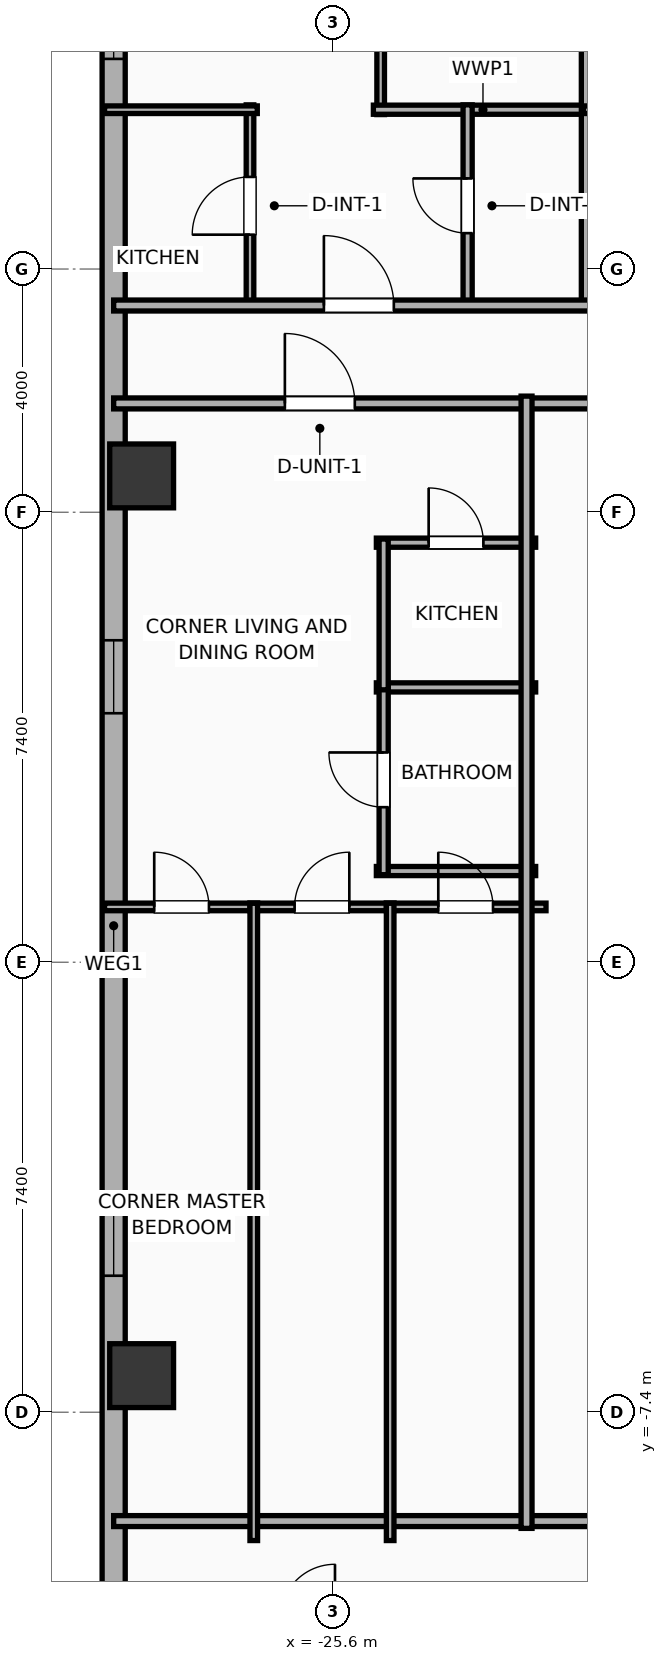
"""IFC4 building model, lengths in metres.
Left out: names, types, materials, properties, quantities, classifications, styles, units other than length and angle.
Written with IfcOpenShell. Run it as: python <this file> out.ifc"""

import sys

from ifc_helpers import new_model, si_unit, direction, frame, frame_2d, origin, origin_2d, place, context, subcontext, project, spatial, rectangle, hollow_rectangle, extrude, element, fill, save


model = new_model("IFC4")
c1 = context("Model", 3, precision=1e-05, world=origin(), true_north=direction((0.0, 1.0)))
c2 = subcontext(c1, "Body", "Model", "MODEL_VIEW")
j1 = project(units=[si_unit("LENGTHUNIT", "METRE"), si_unit("PLANEANGLEUNIT", "RADIAN")], contexts=[c1])
p1 = place(None, origin())
s1 = spatial("IfcSite", under=j1, at=p1, CompositionType="ELEMENT")
p2 = place(p1, origin())
s2 = spatial("IfcBuilding", under=s1, at=p2, CompositionType="ELEMENT")
p3 = place(p2, frame((0.0, 0.0, 109.2)))
s3 = spatial("IfcBuildingStorey", under=s2, at=p3, CompositionType="ELEMENT", Elevation=109.2)
for number, where, z_axis, x_axis in (
    (1, (-28.75, 7.998, 0.0), (0.0, 0.0, 1.0), (1.0, 0.0, 0.0)),
    (2, (-28.75, -6.798, 0.0), (0.0, 0.0, 1.0), (1.0, 0.0, 0.0)),
):
    element("IfcColumn", number, at=place(p3, frame(where, z_axis=z_axis, x_axis=x_axis)), inside=s3, PredefinedType="COLUMN", context=c2, shape_type="SweptSolid", body=[
        extrude(hollow_rectangle(XDim=1.05, YDim=1.05, WallThickness=0.036, at=origin_2d()), origin(), (0.0, 0.0, 1.0), 3.9),
    ])
p4 = place(p3, frame((-29.21, -16.581, 0.0), z_axis=(0.0, 0.0, 1.0), x_axis=(0.0, 1.0, 0.0)))
e3 = element("IfcWall", 3, at=p4, inside=s3, PredefinedType="ELEMENTEDWALL", context=c2, shape_type="SweptSolid", body=[
    extrude(rectangle(XDim=34.363, YDim=0.38, at=frame_2d((17.181, 0.0))), origin(), (0.0, 0.0, 1.0), 3.65),
])
p5 = place(p4, frame((31.437, 0.0, 0.75)))
e4 = element("IfcOpeningElement", 4, at=p5, cuts=e3, PredefinedType="OPENING", context=c2, shape_type="SweptSolid", body=[
    extrude(rectangle(XDim=1.2, YDim=2.05, at=frame_2d((0.6, 1.025))), frame((0.0, 0.2, 0.0), z_axis=(0.0, -1.0, 0.0), x_axis=(1.0, 0.0, 0.0)), (0.0, 0.0, 1.0), 0.4),
])
p6 = place(p4, frame((20.676, 0.0, 0.75)))
e5 = element("IfcOpeningElement", 5, at=p6, cuts=e3, PredefinedType="OPENING", context=c2, shape_type="SweptSolid", body=[
    extrude(rectangle(XDim=1.2, YDim=2.05, at=frame_2d((0.6, 1.025))), frame((0.0, 0.2, 0.0), z_axis=(0.0, -1.0, 0.0), x_axis=(1.0, 0.0, 0.0)), (0.0, 0.0, 1.0), 0.4),
])
p7 = place(p4, frame((11.426, 0.0, 0.75)))
e6 = element("IfcOpeningElement", 6, at=p7, cuts=e3, PredefinedType="OPENING", context=c2, shape_type="SweptSolid", body=[
    extrude(rectangle(XDim=1.2, YDim=2.05, at=frame_2d((0.6, 1.025))), frame((0.0, 0.2, 0.0), z_axis=(0.0, -1.0, 0.0), x_axis=(1.0, 0.0, 0.0)), (0.0, 0.0, 1.0), 0.4),
])
p8 = place(p3, frame((-29.21, 9.19, 0.0), z_axis=(0.0, 0.0, 1.0), x_axis=(1.0, 0.0, 0.0)))
e7 = element("IfcWall", 7, at=p8, inside=s3, PredefinedType="PARTITIONING", context=c2, shape_type="SweptSolid", body=[
    extrude(rectangle(XDim=19.33, YDim=0.18, at=frame_2d((9.665, 0.0))), origin(), (0.0, 0.0, 1.0), 3.65),
])
p9 = place(p8, frame((2.815, 0.0, 0.0)))
e8 = element("IfcOpeningElement", 8, at=p9, cuts=e7, PredefinedType="OPENING", context=c2, shape_type="SweptSolid", body=[
    extrude(rectangle(XDim=1.15, YDim=2.05, at=frame_2d((0.575, 1.025))), frame((0.0, 0.1, 0.0), z_axis=(0.0, -1.0, 0.0), x_axis=(1.0, 0.0, 0.0)), (0.0, 0.0, 1.0), 0.2),
])
p10 = place(p3, frame((-29.21, -9.19, 0.0), z_axis=(0.0, 0.0, 1.0), x_axis=(1.0, 0.0, 0.0)))
e9 = element("IfcWall", 9, at=p10, inside=s3, PredefinedType="PARTITIONING", context=c2, shape_type="SweptSolid", body=[
    extrude(rectangle(XDim=19.33, YDim=0.18, at=frame_2d((9.665, 0.0))), origin(), (0.0, 0.0, 1.0), 3.65),
])
p11 = place(p3, frame((-24.819, 13.94, 0.0), z_axis=(0.0, 0.0, 1.0), x_axis=(0.0, 1.0, 0.0)))
e10 = element("IfcWall", 10, at=p11, inside=s3, PredefinedType="PARTITIONING", context=c2, shape_type="SweptSolid", body=[
    extrude(rectangle(XDim=7.82, YDim=0.125, at=frame_2d((3.91, 0.0))), origin(), (0.0, 0.0, 1.0), 3.65),
])
p12 = place(p11, frame((1.427, 0.0, 0.0)))
e11 = element("IfcOpeningElement", 11, at=p12, cuts=e10, PredefinedType="OPENING", context=c2, shape_type="SweptSolid", body=[
    extrude(rectangle(XDim=0.9, YDim=2.05, at=frame_2d((0.45, 1.025))), frame((0.0, 0.073, 0.0), z_axis=(0.0, -1.0, 0.0), x_axis=(1.0, 0.0, 0.0)), (0.0, 0.0, 1.0), 0.145),
])
p13 = place(p3, frame((-24.939, 14.02, 0.0), z_axis=(0.0, 0.0, 1.0), x_axis=(1.0, 0.0, 0.0)))
e12 = element("IfcWall", 12, at=p13, inside=s3, PredefinedType="PLUMBINGWALL", context=c2, shape_type="SweptSolid", body=[
    extrude(rectangle(XDim=3.605, YDim=0.15, at=frame_2d((1.802, 0.0))), origin(), (0.0, 0.0, 1.0), 3.65),
])
p14 = place(p3, frame((-26.968, 10.78, 0.0), z_axis=(0.0, 0.0, 1.0), x_axis=(0.0, 1.0, 0.0)))
e13 = element("IfcWall", 13, at=p14, inside=s3, PredefinedType="PARTITIONING", context=c2, shape_type="SweptSolid", body=[
    extrude(rectangle(XDim=3.32, YDim=0.125, at=frame_2d((1.66, 0.0))), origin(), (0.0, 0.0, 1.0), 3.65),
])
p15 = place(p14, frame((1.185, 0.0, 0.0)))
e14 = element("IfcOpeningElement", 14, at=p15, cuts=e13, PredefinedType="OPENING", context=c2, shape_type="SweptSolid", body=[
    extrude(rectangle(XDim=0.95, YDim=2.05, at=frame_2d((0.475, 1.025))), frame((0.0, 0.073, 0.0), z_axis=(0.0, -1.0, 0.0), x_axis=(1.0, 0.0, 0.0)), (0.0, 0.0, 1.0), 0.145),
])
p16 = place(p3, frame((-29.36, 14.02, 0.0), z_axis=(0.0, 0.0, 1.0), x_axis=(1.0, 0.0, 0.0)))
e15 = element("IfcWall", 15, at=p16, inside=s3, PredefinedType="PARTITIONING", context=c2, shape_type="SweptSolid", body=[
    extrude(rectangle(XDim=2.512, YDim=0.125, at=frame_2d((1.256, 0.0))), origin(), (0.0, 0.0, 1.0), 3.65),
])
p17 = place(p3, frame((-23.389, 10.78, 0.0), z_axis=(0.0, 0.0, 1.0), x_axis=(0.0, 1.0, 0.0)))
e16 = element("IfcWall", 16, at=p17, inside=s3, PredefinedType="PLUMBINGWALL", context=c2, shape_type="SweptSolid", body=[
    extrude(rectangle(XDim=3.32, YDim=0.15, at=frame_2d((1.66, 0.0))), origin(), (0.0, 0.0, 1.0), 3.65),
])
p18 = place(p17, frame((1.21, 0.0, 0.0)))
e17 = element("IfcOpeningElement", 17, at=p18, cuts=e16, PredefinedType="OPENING", context=c2, shape_type="SweptSolid", body=[
    extrude(rectangle(XDim=0.9, YDim=2.05, at=frame_2d((0.45, 1.025))), frame((0.0, 0.085, 0.0), z_axis=(0.0, -1.0, 0.0), x_axis=(1.0, 0.0, 0.0)), (0.0, 0.0, 1.0), 0.17),
])
p19 = place(p3, frame((-21.409, 10.72, 0.0), z_axis=(0.0, 0.0, 1.0), x_axis=(0.0, 1.0, 0.0)))
e18 = element("IfcWall", 18, at=p19, inside=s3, PredefinedType="PARTITIONING", context=c2, shape_type="SweptSolid", body=[
    extrude(rectangle(XDim=10.89, YDim=0.22, at=frame_2d((5.445, 0.0))), origin(), (0.0, 0.0, 1.0), 3.65),
])
p20 = place(p3, frame((-21.484, 14.02, 0.0), z_axis=(0.0, 0.0, 1.0), x_axis=(1.0, 0.0, 0.0)))
e19 = element("IfcWall", 19, at=p20, inside=s3, PredefinedType="PARTITIONING", context=c2, shape_type="SweptSolid", body=[
    extrude(rectangle(XDim=2.505, YDim=0.125, at=frame_2d((1.252, 0.0))), origin(), (0.0, 0.0, 1.0), 3.65),
])
p21 = place(p3, frame((-29.21, 10.8, 0.0), z_axis=(0.0, 0.0, 1.0), x_axis=(1.0, 0.0, 0.0)))
e20 = element("IfcWall", 20, at=p21, inside=s3, PredefinedType="PARTITIONING", context=c2, shape_type="SweptSolid", body=[
    extrude(rectangle(XDim=62.42, YDim=0.18, at=frame_2d((31.21, 0.0))), origin(), (0.0, 0.0, 1.0), 3.65),
])
p22 = place(p21, frame((3.457, 0.0, 0.0)))
e21 = element("IfcOpeningElement", 21, at=p22, cuts=e20, PredefinedType="OPENING", context=c2, shape_type="SweptSolid", body=[
    extrude(rectangle(XDim=1.15, YDim=2.05, at=frame_2d((0.575, 1.025))), frame((0.0, 0.1, 0.0), z_axis=(0.0, -1.0, 0.0), x_axis=(1.0, 0.0, 0.0)), (0.0, 0.0, 1.0), 0.2),
])
p23 = place(p21, frame((11.297, 0.0, 0.0)))
e22 = element("IfcOpeningElement", 22, at=p23, cuts=e20, PredefinedType="OPENING", context=c2, shape_type="SweptSolid", body=[
    extrude(rectangle(XDim=1.15, YDim=2.05, at=frame_2d((0.575, 1.025))), frame((0.0, 0.1, 0.0), z_axis=(0.0, -1.0, 0.0), x_axis=(1.0, 0.0, 0.0)), (0.0, 0.0, 1.0), 0.2),
])
p24 = place(p21, frame((18.925, 0.0, 0.0)))
e23 = element("IfcOpeningElement", 23, at=p24, cuts=e20, PredefinedType="OPENING", context=c2, shape_type="SweptSolid", body=[
    extrude(rectangle(XDim=1.15, YDim=2.05, at=frame_2d((0.575, 1.025))), frame((0.0, 0.1, 0.0), z_axis=(0.0, -1.0, 0.0), x_axis=(1.0, 0.0, 0.0)), (0.0, 0.0, 1.0), 0.2),
])
p25 = place(p21, frame((24.362, 0.0, 0.0)))
e24 = element("IfcOpeningElement", 24, at=p25, cuts=e20, PredefinedType="OPENING", context=c2, shape_type="SweptSolid", body=[
    extrude(rectangle(XDim=1.15, YDim=2.05, at=frame_2d((0.575, 1.025))), frame((0.0, 0.1, 0.0), z_axis=(0.0, -1.0, 0.0), x_axis=(1.0, 0.0, 0.0)), (0.0, 0.0, 1.0), 0.2),
])
p26 = place(p21, frame((27.708, 0.0, 0.0)))
e25 = element("IfcOpeningElement", 25, at=p26, cuts=e20, PredefinedType="OPENING", context=c2, shape_type="SweptSolid", body=[
    extrude(rectangle(XDim=1.15, YDim=2.05, at=frame_2d((0.575, 1.025))), frame((0.0, 0.1, 0.0), z_axis=(0.0, -1.0, 0.0), x_axis=(1.0, 0.0, 0.0)), (0.0, 0.0, 1.0), 0.2),
])
p27 = place(p21, frame((34.618, 0.0, 0.0)))
e26 = element("IfcOpeningElement", 26, at=p27, cuts=e20, PredefinedType="OPENING", context=c2, shape_type="SweptSolid", body=[
    extrude(rectangle(XDim=0.9, YDim=2.05, at=frame_2d((0.45, 1.025))), frame((0.0, 0.1, 0.0), z_axis=(0.0, -1.0, 0.0), x_axis=(1.0, 0.0, 0.0)), (0.0, 0.0, 1.0), 0.2),
])
p28 = place(p21, frame((43.106, 0.0, 0.0)))
e27 = element("IfcOpeningElement", 27, at=p28, cuts=e20, PredefinedType="OPENING", context=c2, shape_type="SweptSolid", body=[
    extrude(rectangle(XDim=1.15, YDim=2.05, at=frame_2d((0.575, 1.025))), frame((0.0, 0.1, 0.0), z_axis=(0.0, -1.0, 0.0), x_axis=(1.0, 0.0, 0.0)), (0.0, 0.0, 1.0), 0.2),
])
p29 = place(p21, frame((51.777, 0.0, 0.0)))
e28 = element("IfcOpeningElement", 28, at=p29, cuts=e20, PredefinedType="OPENING", context=c2, shape_type="SweptSolid", body=[
    extrude(rectangle(XDim=0.9, YDim=2.05, at=frame_2d((0.45, 1.025))), frame((0.0, 0.1, 0.0), z_axis=(0.0, -1.0, 0.0), x_axis=(1.0, 0.0, 0.0)), (0.0, 0.0, 1.0), 0.2),
])
p30 = place(p21, frame((58.718, 0.0, 0.0)))
e29 = element("IfcOpeningElement", 29, at=p30, cuts=e20, PredefinedType="OPENING", context=c2, shape_type="SweptSolid", body=[
    extrude(rectangle(XDim=0.9, YDim=2.05, at=frame_2d((0.45, 1.025))), frame((0.0, 0.1, 0.0), z_axis=(0.0, -1.0, 0.0), x_axis=(1.0, 0.0, 0.0)), (0.0, 0.0, 1.0), 0.2),
])
p31 = place(p3, frame((-24.89, 6.9, 0.0), z_axis=(0.0, 0.0, 1.0), x_axis=(1.0, 0.0, 0.0)))
e30 = element("IfcWall", 30, at=p31, inside=s3, PredefinedType="PLUMBINGWALL", context=c2, shape_type="SweptSolid", body=[
    extrude(rectangle(XDim=2.62, YDim=0.15, at=frame_2d((1.31, 0.0))), origin(), (0.0, 0.0, 1.0), 3.65),
])
p32 = place(p31, frame((0.86, 0.0, 0.0)))
e31 = element("IfcOpeningElement", 31, at=p32, cuts=e30, PredefinedType="OPENING", context=c2, shape_type="SweptSolid", body=[
    extrude(rectangle(XDim=0.9, YDim=2.05, at=frame_2d((0.45, 1.025))), frame((0.0, 0.085, 0.0), z_axis=(0.0, -1.0, 0.0), x_axis=(1.0, 0.0, 0.0)), (0.0, 0.0, 1.0), 0.17),
])
for number, where, z_axis, x_axis in (
    (32, (-24.89, 4.52, 0.0), (0.0, 0.0, 1.0), (1.0, 0.0, 0.0)),
    (33, (-24.89, 1.5, 0.0), (0.0, 0.0, 1.0), (1.0, 0.0, 0.0)),
):
    element("IfcWall", number, at=place(p3, frame(where, z_axis=z_axis, x_axis=x_axis)), inside=s3, PredefinedType="PLUMBINGWALL", context=c2, shape_type="SweptSolid", body=[
        extrude(rectangle(XDim=2.62, YDim=0.15, at=frame_2d((1.31, 0.0))), origin(), (0.0, 0.0, 1.0), 3.65),
    ])
p33 = place(p3, frame((-24.77, 1.44, 0.0), z_axis=(0.0, 0.0, 1.0), x_axis=(0.0, 1.0, 0.0)))
e34 = element("IfcWall", 34, at=p33, inside=s3, PredefinedType="PLUMBINGWALL", context=c2, shape_type="SweptSolid", body=[
    extrude(rectangle(XDim=3.12, YDim=0.15, at=frame_2d((1.56, 0.0))), origin(), (0.0, 0.0, 1.0), 3.65),
])
p34 = place(p33, frame((1.11, 0.0, 0.0)))
e35 = element("IfcOpeningElement", 35, at=p34, cuts=e34, PredefinedType="OPENING", context=c2, shape_type="SweptSolid", body=[
    extrude(rectangle(XDim=0.9, YDim=2.05, at=frame_2d((0.45, 1.025))), frame((0.0, 0.085, 0.0), z_axis=(0.0, -1.0, 0.0), x_axis=(1.0, 0.0, 0.0)), (0.0, 0.0, 1.0), 0.17),
])
p35 = place(p3, frame((-24.77, 4.48, 0.0), z_axis=(0.0, 0.0, 1.0), x_axis=(0.0, 1.0, 0.0)))
e36 = element("IfcWall", 36, at=p35, inside=s3, PredefinedType="PLUMBINGWALL", context=c2, shape_type="SweptSolid", body=[
    extrude(rectangle(XDim=2.48, YDim=0.15, at=frame_2d((1.24, 0.0))), origin(), (0.0, 0.0, 1.0), 3.65),
])
p36 = place(p3, frame((-29.36, 0.91, 0.0), z_axis=(0.0, 0.0, 1.0), x_axis=(1.0, 0.0, 0.0)))
e37 = element("IfcWall", 37, at=p36, inside=s3, PredefinedType="PARTITIONING", context=c2, shape_type="SweptSolid", body=[
    extrude(rectangle(XDim=2.517, YDim=0.125, at=frame_2d((1.258, 0.0))), origin(), (0.0, 0.0, 1.0), 3.65),
])
p37 = place(p36, frame((0.817, 0.0, 0.0)))
e38 = element("IfcOpeningElement", 38, at=p37, cuts=e37, PredefinedType="OPENING", context=c2, shape_type="SweptSolid", body=[
    extrude(rectangle(XDim=0.9, YDim=2.05, at=frame_2d((0.45, 1.025))), frame((0.0, 0.073, 0.0), z_axis=(0.0, -1.0, 0.0), x_axis=(1.0, 0.0, 0.0)), (0.0, 0.0, 1.0), 0.145),
])
p38 = place(p3, frame((-26.969, 0.91, 0.0), z_axis=(0.0, 0.0, 1.0), x_axis=(1.0, 0.0, 0.0)))
e39 = element("IfcWall", 39, at=p38, inside=s3, PredefinedType="PARTITIONING", context=c2, shape_type="SweptSolid", body=[
    extrude(rectangle(XDim=2.368, YDim=0.125, at=frame_2d((1.184, 0.0))), origin(), (0.0, 0.0, 1.0), 3.65),
])
p39 = place(p38, frame((0.734, 0.0, 0.0)))
e40 = element("IfcOpeningElement", 40, at=p39, cuts=e39, PredefinedType="OPENING", context=c2, shape_type="SweptSolid", body=[
    extrude(rectangle(XDim=0.9, YDim=2.05, at=frame_2d((0.45, 1.025))), frame((0.0, 0.073, 0.0), z_axis=(0.0, -1.0, 0.0), x_axis=(1.0, 0.0, 0.0)), (0.0, 0.0, 1.0), 0.145),
])
p40 = place(p3, frame((-24.726, 0.91, 0.0), z_axis=(0.0, 0.0, 1.0), x_axis=(1.0, 0.0, 0.0)))
e41 = element("IfcWall", 41, at=p40, inside=s3, PredefinedType="PARTITIONING", context=c2, shape_type="SweptSolid", body=[
    extrude(rectangle(XDim=2.625, YDim=0.125, at=frame_2d((1.313, 0.0))), origin(), (0.0, 0.0, 1.0), 3.65),
])
p41 = place(p40, frame((0.854, 0.0, 0.0)))
e42 = element("IfcOpeningElement", 42, at=p41, cuts=e41, PredefinedType="OPENING", context=c2, shape_type="SweptSolid", body=[
    extrude(rectangle(XDim=0.9, YDim=2.05, at=frame_2d((0.45, 1.025))), frame((0.0, 0.073, 0.0), z_axis=(0.0, -1.0, 0.0), x_axis=(1.0, 0.0, 0.0)), (0.0, 0.0, 1.0), 0.145),
])
for number, where, z_axis, x_axis in (
    (43, (-24.663, -9.51, 0.0), (0.0, 0.0, 1.0), (0.0, 1.0, 0.0)),
    (44, (-26.906, -9.51, 0.0), (0.0, 0.0, 1.0), (0.0, 1.0, 0.0)),
):
    element("IfcWall", number, at=place(p3, frame(where, z_axis=z_axis, x_axis=x_axis)), inside=s3, PredefinedType="PARTITIONING", context=c2, shape_type="SweptSolid", body=[
        extrude(rectangle(XDim=10.48, YDim=0.125, at=frame_2d((5.24, 0.0))), origin(), (0.0, 0.0, 1.0), 3.65),
    ])
p42 = place(p3, frame((-22.42, -9.31, 0.0), z_axis=(0.0, 0.0, 1.0), x_axis=(0.0, 1.0, 0.0)))
e45 = element("IfcWall", 45, at=p42, inside=s3, PredefinedType="PARTITIONING", context=c2, shape_type="SweptSolid", body=[
    extrude(rectangle(XDim=18.62, YDim=0.18, at=frame_2d((9.31, 0.0))), origin(), (0.0, 0.0, 1.0), 3.65),
])
p43 = place(p5, origin())
e46 = element("IfcWindow", 46, at=p43, inside=s3, PartitioningType="SINGLE_PANEL", PredefinedType="WINDOW", context=c2, shape_type="SweptSolid", body=[
    extrude(rectangle(XDim=1.2, YDim=2.05, at=frame_2d((0.6, 1.025))), frame((0.0, 0.03, 0.0), z_axis=(0.0, -1.0, 0.0), x_axis=(1.0, 0.0, 0.0)), (0.0, 0.0, 1.0), 0.06),
])
fill(e4, e46)
p44 = place(p6, origin())
e47 = element("IfcWindow", 47, at=p44, inside=s3, PartitioningType="SINGLE_PANEL", PredefinedType="WINDOW", context=c2, shape_type="SweptSolid", body=[
    extrude(rectangle(XDim=1.2, YDim=2.05, at=frame_2d((0.6, 1.025))), frame((0.0, 0.03, 0.0), z_axis=(0.0, -1.0, 0.0), x_axis=(1.0, 0.0, 0.0)), (0.0, 0.0, 1.0), 0.06),
])
fill(e5, e47)
p45 = place(p7, origin())
e48 = element("IfcWindow", 48, at=p45, inside=s3, PartitioningType="SINGLE_PANEL", PredefinedType="WINDOW", context=c2, shape_type="SweptSolid", body=[
    extrude(rectangle(XDim=1.2, YDim=2.05, at=frame_2d((0.6, 1.025))), frame((0.0, 0.03, 0.0), z_axis=(0.0, -1.0, 0.0), x_axis=(1.0, 0.0, 0.0)), (0.0, 0.0, 1.0), 0.06),
])
fill(e6, e48)
p46 = place(p9, origin())
e49 = element("IfcDoor", 49, at=p46, inside=s3, OperationType="SINGLE_SWING_LEFT", PredefinedType="DOOR", context=c2, shape_type="SweptSolid", body=[
    extrude(rectangle(XDim=1.15, YDim=2.05, at=frame_2d((0.575, 1.025))), frame((0.0, 0.025, 0.0), z_axis=(0.0, -1.0, 0.0), x_axis=(1.0, 0.0, 0.0)), (0.0, 0.0, 1.0), 0.05),
])
fill(e8, e49)
p47 = place(p15, origin())
e50 = element("IfcDoor", 50, at=p47, inside=s3, OperationType="SINGLE_SWING_LEFT", PredefinedType="DOOR", context=c2, shape_type="SweptSolid", body=[
    extrude(rectangle(XDim=0.95, YDim=2.05, at=frame_2d((0.475, 1.025))), frame((0.0, 0.025, 0.0), z_axis=(0.0, -1.0, 0.0), x_axis=(1.0, 0.0, 0.0)), (0.0, 0.0, 1.0), 0.05),
])
fill(e14, e50)
p48 = place(p18, origin())
e51 = element("IfcDoor", 51, at=p48, inside=s3, OperationType="SINGLE_SWING_RIGHT", PredefinedType="DOOR", context=c2, shape_type="SweptSolid", body=[
    extrude(rectangle(XDim=0.9, YDim=2.05, at=frame_2d((0.45, 1.025))), frame((0.0, 0.025, 0.0), z_axis=(0.0, -1.0, 0.0), x_axis=(1.0, 0.0, 0.0)), (0.0, 0.0, 1.0), 0.05),
])
fill(e17, e51)
p49 = place(p22, origin())
e52 = element("IfcDoor", 52, at=p49, inside=s3, OperationType="SINGLE_SWING_LEFT", PredefinedType="DOOR", context=c2, shape_type="SweptSolid", body=[
    extrude(rectangle(XDim=1.15, YDim=2.05, at=frame_2d((0.575, 1.025))), frame((0.0, 0.025, 0.0), z_axis=(0.0, -1.0, 0.0), x_axis=(1.0, 0.0, 0.0)), (0.0, 0.0, 1.0), 0.05),
])
fill(e21, e52)
p50 = place(p32, origin())
e53 = element("IfcDoor", 53, at=p50, inside=s3, OperationType="SINGLE_SWING_LEFT", PredefinedType="DOOR", context=c2, shape_type="SweptSolid", body=[
    extrude(rectangle(XDim=0.9, YDim=2.05, at=frame_2d((0.45, 1.025))), frame((0.0, 0.025, 0.0), z_axis=(0.0, -1.0, 0.0), x_axis=(1.0, 0.0, 0.0)), (0.0, 0.0, 1.0), 0.05),
])
fill(e31, e53)
p51 = place(p34, origin())
e54 = element("IfcDoor", 54, at=p51, inside=s3, OperationType="SINGLE_SWING_RIGHT", PredefinedType="DOOR", context=c2, shape_type="SweptSolid", body=[
    extrude(rectangle(XDim=0.9, YDim=2.05, at=frame_2d((0.45, 1.025))), frame((0.0, 0.025, 0.0), z_axis=(0.0, -1.0, 0.0), x_axis=(1.0, 0.0, 0.0)), (0.0, 0.0, 1.0), 0.05),
])
fill(e35, e54)
p52 = place(p37, origin())
e55 = element("IfcDoor", 55, at=p52, inside=s3, OperationType="SINGLE_SWING_LEFT", PredefinedType="DOOR", context=c2, shape_type="SweptSolid", body=[
    extrude(rectangle(XDim=0.9, YDim=2.05, at=frame_2d((0.45, 1.025))), frame((0.0, 0.025, 0.0), z_axis=(0.0, -1.0, 0.0), x_axis=(1.0, 0.0, 0.0)), (0.0, 0.0, 1.0), 0.05),
])
fill(e38, e55)
p53 = place(p39, origin())
e56 = element("IfcDoor", 56, at=p53, inside=s3, OperationType="SINGLE_SWING_RIGHT", PredefinedType="DOOR", context=c2, shape_type="SweptSolid", body=[
    extrude(rectangle(XDim=0.9, YDim=2.05, at=frame_2d((0.45, 1.025))), frame((0.0, 0.025, 0.0), z_axis=(0.0, -1.0, 0.0), x_axis=(1.0, 0.0, 0.0)), (0.0, 0.0, 1.0), 0.05),
])
fill(e40, e56)
p54 = place(p41, origin())
e57 = element("IfcDoor", 57, at=p54, inside=s3, OperationType="SINGLE_SWING_LEFT", PredefinedType="DOOR", context=c2, shape_type="SweptSolid", body=[
    extrude(rectangle(XDim=0.9, YDim=2.05, at=frame_2d((0.45, 1.025))), frame((0.0, 0.025, 0.0), z_axis=(0.0, -1.0, 0.0), x_axis=(1.0, 0.0, 0.0)), (0.0, 0.0, 1.0), 0.05),
])
fill(e42, e57)
save(model, sys.argv[1])
